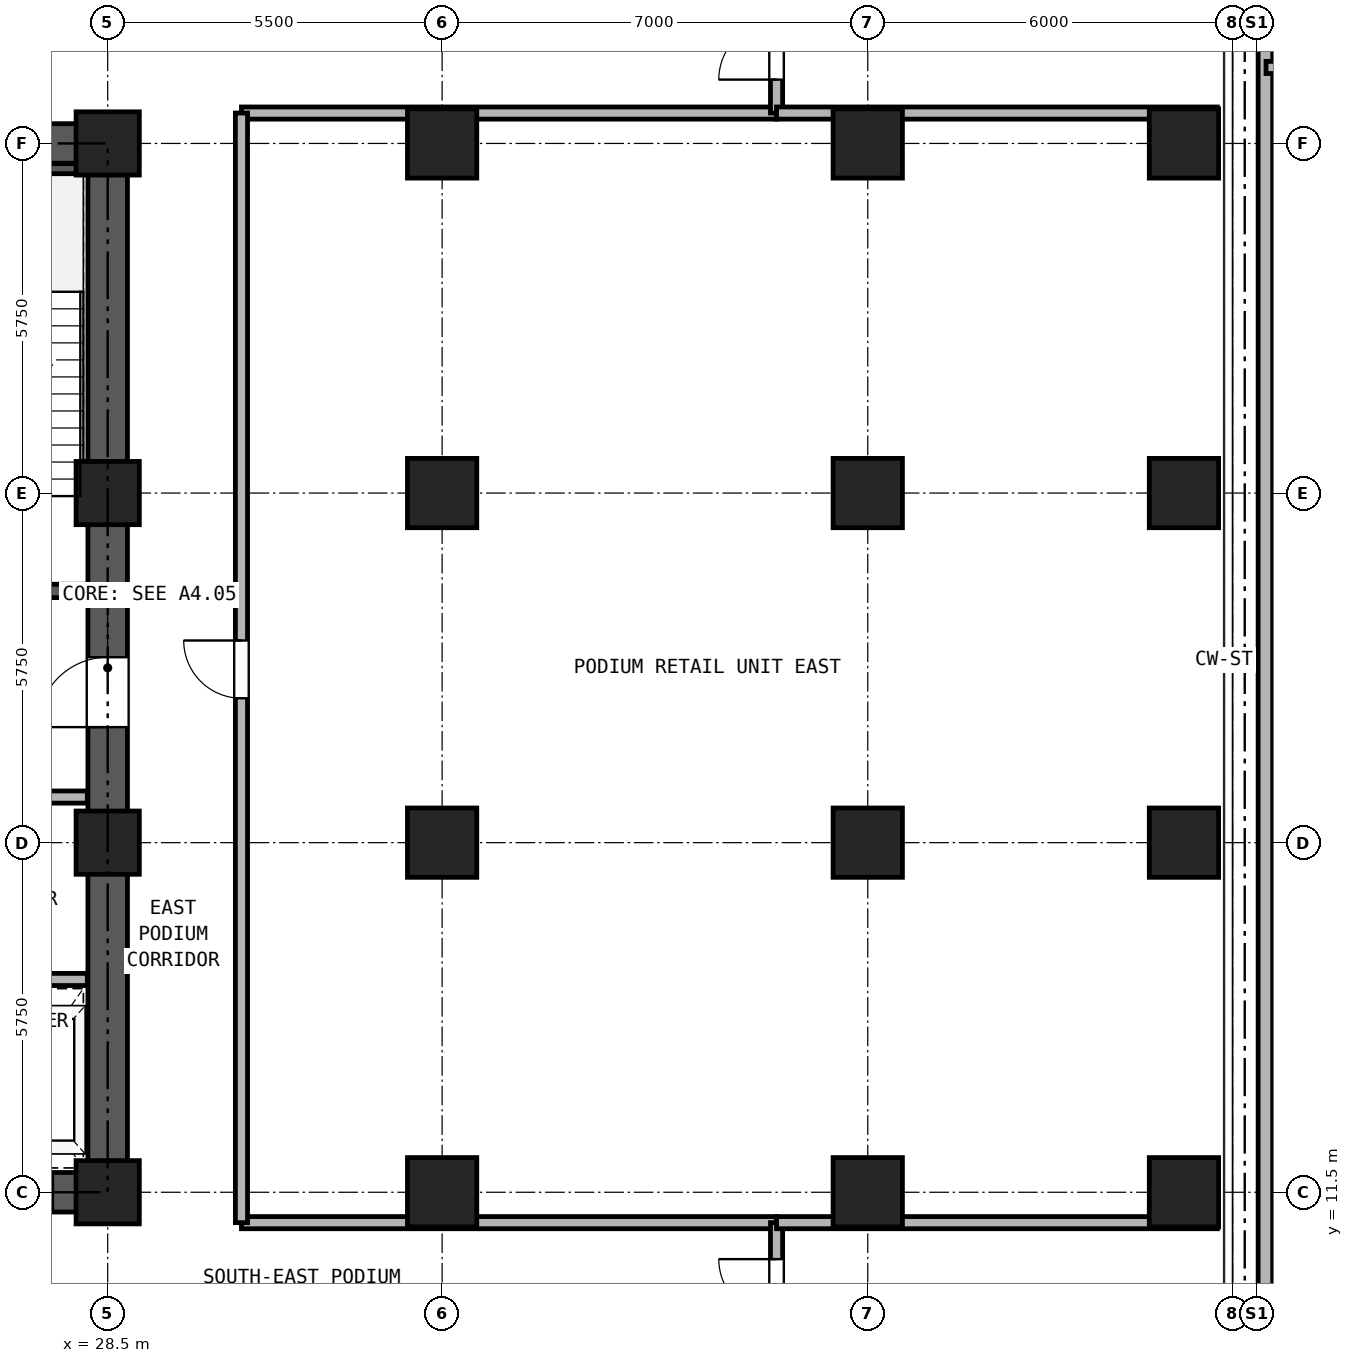
"""IFC4 building model, lengths in metres.
Left out: names, types, materials, properties, quantities, classifications, styles, units other than length and angle.
Written with IfcOpenShell. Run it as: python <this file> out.ifc"""

import sys

from ifc_helpers import new_model, si_unit, direction, frame, frame_2d, origin, origin_2d, place, context, subcontext, project, spatial, rectangle, hollow_rectangle, extrude, source, transform, mapped, element, fill, save


model = new_model("IFC4")
c1 = context("Model", 3, precision=1e-05, world=origin(), true_north=direction((0.0, 1.0)))
c2 = subcontext(c1, "Body", "Model", "MODEL_VIEW")
j1 = project(units=[si_unit("LENGTHUNIT", "METRE"), si_unit("PLANEANGLEUNIT", "RADIAN")], contexts=[c1])
p1 = place(None, origin())
s1 = spatial("IfcSite", under=j1, at=p1, CompositionType="ELEMENT")
p2 = place(p1, origin())
s2 = spatial("IfcBuilding", under=s1, at=p2, CompositionType="ELEMENT")
p3 = place(p2, frame((0.0, 0.0, 9.0)))
s3 = spatial("IfcBuildingStorey", under=s2, at=p3, CompositionType="ELEMENT", Elevation=9.0)
m1 = source(origin(), c2, "Body", "SweptSolid", [
    extrude(hollow_rectangle(XDim=1.14, YDim=1.14, WallThickness=0.07, at=origin_2d()), origin(), (0.0, 0.0, 1.0), 4.18),
])
for number, where, z_axis, x_axis in (
    (1, (46.2, 11.5, 0.0), (0.0, 0.0, 1.0), (1.0, 0.0, 0.0)),
    (2, (46.2, 17.25, 0.0), (0.0, 0.0, 1.0), (1.0, 0.0, 0.0)),
    (3, (46.2, 23.0, 0.0), (0.0, 0.0, 1.0), (1.0, 0.0, 0.0)),
    (4, (46.2, 28.75, 0.0), (0.0, 0.0, 1.0), (1.0, 0.0, 0.0)),
):
    element("IfcColumn", number, at=place(p3, frame(where, z_axis=z_axis, x_axis=x_axis)), inside=s3, PredefinedType="COLUMN", context=c2, shape_type="MappedRepresentation", body=[
        mapped(m1, transform((0.0, 0.0, 0.0), x_axis=(1.0, 0.0, 0.0), y_axis=(0.0, 1.0, 0.0), z_axis=(0.0, 0.0, 1.0), scale=1.0)),
    ])
m2 = source(origin(), c2, "Body", "SweptSolid", [
    extrude(hollow_rectangle(XDim=1.04, YDim=1.04, WallThickness=0.065, at=origin_2d()), origin(), (0.0, 0.0, 1.0), 4.18),
])
for number, where, z_axis, x_axis in (
    (5, (28.5, 11.5, 0.0), (0.0, 0.0, 1.0), (1.0, 0.0, 0.0)),
    (6, (28.5, 17.25, 0.0), (0.0, 0.0, 1.0), (1.0, 0.0, 0.0)),
    (7, (28.5, 23.0, 0.0), (0.0, 0.0, 1.0), (1.0, 0.0, 0.0)),
    (8, (28.5, 28.75, 0.0), (0.0, 0.0, 1.0), (1.0, 0.0, 0.0)),
):
    element("IfcColumn", number, at=place(p3, frame(where, z_axis=z_axis, x_axis=x_axis)), inside=s3, PredefinedType="COLUMN", context=c2, shape_type="MappedRepresentation", body=[
        mapped(m2, transform((0.0, 0.0, 0.0), x_axis=(1.0, 0.0, 0.0), y_axis=(0.0, 1.0, 0.0), z_axis=(0.0, 0.0, 1.0), scale=1.0)),
    ])
for number, where, z_axis, x_axis in (
    (9, (34.0, 11.5, 0.0), (0.0, 0.0, 1.0), (1.0, 0.0, 0.0)),
    (10, (34.0, 17.25, 0.0), (0.0, 0.0, 1.0), (1.0, 0.0, 0.0)),
    (11, (34.0, 23.0, 0.0), (0.0, 0.0, 1.0), (1.0, 0.0, 0.0)),
    (12, (34.0, 28.75, 0.0), (0.0, 0.0, 1.0), (1.0, 0.0, 0.0)),
    (13, (41.0, 11.5, 0.0), (0.0, 0.0, 1.0), (1.0, 0.0, 0.0)),
    (14, (41.0, 17.25, 0.0), (0.0, 0.0, 1.0), (1.0, 0.0, 0.0)),
    (15, (41.0, 23.0, 0.0), (0.0, 0.0, 1.0), (1.0, 0.0, 0.0)),
    (16, (41.0, 28.75, 0.0), (0.0, 0.0, 1.0), (1.0, 0.0, 0.0)),
):
    element("IfcColumn", number, at=place(p3, frame(where, z_axis=z_axis, x_axis=x_axis)), inside=s3, PredefinedType="COLUMN", context=c2, shape_type="MappedRepresentation", body=[
        mapped(m1, transform((0.0, 0.0, 0.0), x_axis=(1.0, 0.0, 0.0), y_axis=(0.0, 1.0, 0.0), z_axis=(0.0, 0.0, 1.0), scale=1.0)),
    ])
p4 = place(p3, frame((47.54, -0.54, 0.0), z_axis=(0.0, 0.0, 1.0), x_axis=(0.0, 1.0, 0.0)))
e17 = element("IfcWall", 17, at=p4, inside=s3, PredefinedType="SOLIDWALL", context=c2, shape_type="SweptSolid", body=[
    extrude(rectangle(XDim=40.89, YDim=0.24, at=frame_2d((20.445, 0.0))), origin(), (0.0, 0.0, 1.0), 4.18),
])
p5 = place(p3, frame((18.175, 11.5, 0.0), z_axis=(0.0, 0.0, 1.0), x_axis=(1.0, 0.0, 0.0)))
e18 = element("IfcWall", 18, at=p5, inside=s3, PredefinedType="SHEAR", context=c2, shape_type="SweptSolid", body=[
    extrude(rectangle(XDim=10.65, YDim=0.65, at=frame_2d((5.325, 0.0))), origin(), (0.0, 0.0, 1.0), 4.18),
])
p6 = place(p5, frame((1.195, 0.0, 0.0)))
e19 = element("IfcOpeningElement", 19, at=p6, cuts=e18, PredefinedType="OPENING", context=c2, shape_type="SweptSolid", body=[
    extrude(rectangle(XDim=1.1, YDim=2.25, at=frame_2d((0.55, 1.125))), frame((0.0, 0.335, 0.0), z_axis=(0.0, -1.0, 0.0), x_axis=(1.0, 0.0, 0.0)), (0.0, 0.0, 1.0), 0.67),
])
p7 = place(p5, frame((3.495, 0.0, 0.0)))
e20 = element("IfcOpeningElement", 20, at=p7, cuts=e18, PredefinedType="OPENING", context=c2, shape_type="SweptSolid", body=[
    extrude(rectangle(XDim=1.1, YDim=2.25, at=frame_2d((0.55, 1.125))), frame((0.0, 0.335, 0.0), z_axis=(0.0, -1.0, 0.0), x_axis=(1.0, 0.0, 0.0)), (0.0, 0.0, 1.0), 0.67),
])
p8 = place(p5, frame((5.925, 0.0, 0.0)))
e21 = element("IfcOpeningElement", 21, at=p8, cuts=e18, PredefinedType="OPENING", context=c2, shape_type="SweptSolid", body=[
    extrude(rectangle(XDim=1.1, YDim=2.25, at=frame_2d((0.55, 1.125))), frame((0.0, 0.335, 0.0), z_axis=(0.0, -1.0, 0.0), x_axis=(1.0, 0.0, 0.0)), (0.0, 0.0, 1.0), 0.67),
])
p9 = place(p5, frame((8.325, 0.0, 0.0)))
e22 = element("IfcOpeningElement", 22, at=p9, cuts=e18, PredefinedType="OPENING", context=c2, shape_type="SweptSolid", body=[
    extrude(rectangle(XDim=1.1, YDim=2.25, at=frame_2d((0.55, 1.125))), frame((0.0, 0.335, 0.0), z_axis=(0.0, -1.0, 0.0), x_axis=(1.0, 0.0, 0.0)), (0.0, 0.0, 1.0), 0.67),
])
p10 = place(p3, frame((18.175, 28.75, 0.0), z_axis=(0.0, 0.0, 1.0), x_axis=(1.0, 0.0, 0.0)))
e23 = element("IfcWall", 23, at=p10, inside=s3, PredefinedType="SHEAR", context=c2, shape_type="SweptSolid", body=[
    extrude(rectangle(XDim=10.65, YDim=0.65, at=frame_2d((5.325, 0.0))), origin(), (0.0, 0.0, 1.0), 4.18),
])
p11 = place(p10, frame((4.205, 0.0, 0.0)))
e24 = element("IfcOpeningElement", 24, at=p11, cuts=e23, PredefinedType="OPENING", context=c2, shape_type="SweptSolid", body=[
    extrude(rectangle(XDim=0.9, YDim=2.05, at=frame_2d((0.45, 1.025))), frame((0.0, 0.335, 0.0), z_axis=(0.0, -1.0, 0.0), x_axis=(1.0, 0.0, 0.0)), (0.0, 0.0, 1.0), 0.67),
])
p12 = place(p10, frame((5.745, 0.0, 0.0)))
e25 = element("IfcOpeningElement", 25, at=p12, cuts=e23, PredefinedType="OPENING", context=c2, shape_type="SweptSolid", body=[
    extrude(rectangle(XDim=0.9, YDim=2.05, at=frame_2d((0.45, 1.025))), frame((0.0, 0.335, 0.0), z_axis=(0.0, -1.0, 0.0), x_axis=(1.0, 0.0, 0.0)), (0.0, 0.0, 1.0), 0.67),
])
p13 = place(p3, frame((28.5, 11.825, 0.0), z_axis=(0.0, 0.0, 1.0), x_axis=(0.0, 1.0, 0.0)))
e26 = element("IfcWall", 26, at=p13, inside=s3, PredefinedType="SHEAR", context=c2, shape_type="SweptSolid", body=[
    extrude(rectangle(XDim=16.6, YDim=0.65, at=frame_2d((8.3, 0.0))), origin(), (0.0, 0.0, 1.0), 4.18),
])
p14 = place(p13, frame((7.325, 0.0, 0.0)))
e27 = element("IfcOpeningElement", 27, at=p14, cuts=e26, PredefinedType="OPENING", context=c2, shape_type="SweptSolid", body=[
    extrude(rectangle(XDim=1.15, YDim=2.2, at=frame_2d((0.575, 1.1))), frame((0.0, 0.335, 0.0), z_axis=(0.0, -1.0, 0.0), x_axis=(1.0, 0.0, 0.0)), (0.0, 0.0, 1.0), 0.67),
])
p15 = place(p3, frame((25.13, 28.335, 0.0), z_axis=(0.0, 0.0, 1.0), x_axis=(1.0, 0.0, 0.0)))
e28 = element("IfcWall", 28, at=p15, inside=s3, PredefinedType="PARTITIONING", context=c2, shape_type="SweptSolid", body=[
    extrude(rectangle(XDim=3.035, YDim=0.165, at=frame_2d((1.518, 0.0))), origin(), (0.0, 0.0, 1.0), 4.18),
])
p16 = place(p3, frame((25.13, 21.39, 0.0), z_axis=(0.0, 0.0, 1.0), x_axis=(1.0, 0.0, 0.0)))
e29 = element("IfcWall", 29, at=p16, inside=s3, PredefinedType="SOLIDWALL", context=c2, shape_type="SweptSolid", body=[
    extrude(rectangle(XDim=3.035, YDim=0.22, at=frame_2d((1.518, 0.0))), origin(), (0.0, 0.0, 1.0), 4.18),
])
p17 = place(p16, frame((0.92, 0.0, 0.0)))
e30 = element("IfcOpeningElement", 30, at=p17, cuts=e29, PredefinedType="OPENING", context=c2, shape_type="SweptSolid", body=[
    extrude(rectangle(XDim=1.15, YDim=2.2, at=frame_2d((0.575, 1.1))), frame((0.0, 0.12, 0.0), z_axis=(0.0, -1.0, 0.0), x_axis=(1.0, 0.0, 0.0)), (0.0, 0.0, 1.0), 0.24),
])
p18 = place(p3, frame((18.835, 18.0, 0.0), z_axis=(0.0, 0.0, 1.0), x_axis=(1.0, 0.0, 0.0)))
e31 = element("IfcWall", 31, at=p18, inside=s3, PredefinedType="PARTITIONING", context=c2, shape_type="SweptSolid", body=[
    extrude(rectangle(XDim=9.33, YDim=0.2, at=frame_2d((4.665, 0.0))), origin(), (0.0, 0.0, 1.0), 4.18),
])
p19 = place(p18, frame((0.415, 0.0, 0.0)))
e32 = element("IfcOpeningElement", 32, at=p19, cuts=e31, PredefinedType="OPENING", context=c2, shape_type="SweptSolid", body=[
    extrude(rectangle(XDim=1.3, YDim=2.3, at=frame_2d((0.65, 1.15))), frame((0.0, 0.11, 0.0), z_axis=(0.0, -1.0, 0.0), x_axis=(1.0, 0.0, 0.0)), (0.0, 0.0, 1.0), 0.22),
])
p20 = place(p18, frame((2.515, 0.0, 0.0)))
e33 = element("IfcOpeningElement", 33, at=p20, cuts=e31, PredefinedType="OPENING", context=c2, shape_type="SweptSolid", body=[
    extrude(rectangle(XDim=1.3, YDim=2.3, at=frame_2d((0.65, 1.15))), frame((0.0, 0.11, 0.0), z_axis=(0.0, -1.0, 0.0), x_axis=(1.0, 0.0, 0.0)), (0.0, 0.0, 1.0), 0.22),
])
p21 = place(p18, frame((4.915, 0.0, 0.0)))
e34 = element("IfcOpeningElement", 34, at=p21, cuts=e31, PredefinedType="OPENING", context=c2, shape_type="SweptSolid", body=[
    extrude(rectangle(XDim=0.9, YDim=2.05, at=frame_2d((0.45, 1.025))), frame((0.0, 0.11, 0.0), z_axis=(0.0, -1.0, 0.0), x_axis=(1.0, 0.0, 0.0)), (0.0, 0.0, 1.0), 0.22),
])
p22 = place(p18, frame((7.615, 0.0, 0.0)))
e35 = element("IfcOpeningElement", 35, at=p22, cuts=e31, PredefinedType="OPENING", context=c2, shape_type="SweptSolid", body=[
    extrude(rectangle(XDim=0.9, YDim=2.05, at=frame_2d((0.45, 1.025))), frame((0.0, 0.11, 0.0), z_axis=(0.0, -1.0, 0.0), x_axis=(1.0, 0.0, 0.0)), (0.0, 0.0, 1.0), 0.22),
])
p23 = place(p3, frame((18.835, 15.0, 0.0), z_axis=(0.0, 0.0, 1.0), x_axis=(1.0, 0.0, 0.0)))
e36 = element("IfcWall", 36, at=p23, inside=s3, PredefinedType="PARTITIONING", context=c2, shape_type="SweptSolid", body=[
    extrude(rectangle(XDim=9.33, YDim=0.2, at=frame_2d((4.665, 0.0))), origin(), (0.0, 0.0, 1.0), 4.18),
])
for number, where, z_axis, x_axis in (
    (37, (30.7, 11.0, 0.0), (0.0, 0.0, 1.0), (1.0, 0.0, 0.0)),
    (38, (30.7, 29.25, 0.0), (0.0, 0.0, 1.0), (1.0, 0.0, 0.0)),
):
    element("IfcWall", number, at=place(p3, frame(where, z_axis=z_axis, x_axis=x_axis)), inside=s3, PredefinedType="PARTITIONING", context=c2, shape_type="SweptSolid", body=[
        extrude(rectangle(XDim=8.8, YDim=0.2, at=frame_2d((4.4, 0.0))), origin(), (0.0, 0.0, 1.0), 4.18),
    ])
p24 = place(p3, frame((30.7, 11.0, 0.0), z_axis=(0.0, 0.0, 1.0), x_axis=(0.0, 1.0, 0.0)))
e39 = element("IfcWall", 39, at=p24, inside=s3, PredefinedType="PARTITIONING", context=c2, shape_type="SweptSolid", body=[
    extrude(rectangle(XDim=18.25, YDim=0.2, at=frame_2d((9.125, 0.0))), origin(), (0.0, 0.0, 1.0), 4.18),
])
p25 = place(p24, frame((8.625, 0.0, 0.0)))
e40 = element("IfcOpeningElement", 40, at=p25, cuts=e39, PredefinedType="OPENING", context=c2, shape_type="SweptSolid", body=[
    extrude(rectangle(XDim=0.95, YDim=2.15, at=frame_2d((0.475, 1.075))), frame((0.0, 0.11, 0.0), z_axis=(0.0, -1.0, 0.0), x_axis=(1.0, 0.0, 0.0)), (0.0, 0.0, 1.0), 0.22),
])
p26 = place(p3, frame((39.5, 0.25, 0.0), z_axis=(0.0, 0.0, 1.0), x_axis=(0.0, 1.0, 0.0)))
e41 = element("IfcWall", 41, at=p26, inside=s3, PredefinedType="PARTITIONING", context=c2, shape_type="SweptSolid", body=[
    extrude(rectangle(XDim=10.75, YDim=0.2, at=frame_2d((5.375, 0.0))), origin(), (0.0, 0.0, 1.0), 4.18),
])
p27 = place(p26, frame((9.2, 0.0, 0.0)))
e42 = element("IfcOpeningElement", 42, at=p27, cuts=e41, PredefinedType="OPENING", context=c2, shape_type="SweptSolid", body=[
    extrude(rectangle(XDim=0.95, YDim=2.15, at=frame_2d((0.475, 1.075))), frame((0.0, 0.11, 0.0), z_axis=(0.0, -1.0, 0.0), x_axis=(1.0, 0.0, 0.0)), (0.0, 0.0, 1.0), 0.22),
])
p28 = place(p3, frame((39.5, 29.25, 0.0), z_axis=(0.0, 0.0, 1.0), x_axis=(0.0, 1.0, 0.0)))
e43 = element("IfcWall", 43, at=p28, inside=s3, PredefinedType="PARTITIONING", context=c2, shape_type="SweptSolid", body=[
    extrude(rectangle(XDim=11.0, YDim=0.2, at=frame_2d((5.5, 0.0))), origin(), (0.0, 0.0, 1.0), 4.18),
])
p29 = place(p28, frame((0.55, 0.0, 0.0)))
e44 = element("IfcOpeningElement", 44, at=p29, cuts=e43, PredefinedType="OPENING", context=c2, shape_type="SweptSolid", body=[
    extrude(rectangle(XDim=0.95, YDim=2.15, at=frame_2d((0.475, 1.075))), frame((0.0, 0.11, 0.0), z_axis=(0.0, -1.0, 0.0), x_axis=(1.0, 0.0, 0.0)), (0.0, 0.0, 1.0), 0.22),
])
for number, where, z_axis, x_axis in (
    (45, (39.5, 11.0, 0.0), (0.0, 0.0, 1.0), (1.0, 0.0, 0.0)),
    (46, (39.5, 29.25, 0.0), (0.0, 0.0, 1.0), (1.0, 0.0, 0.0)),
):
    element("IfcWall", number, at=place(p3, frame(where, z_axis=z_axis, x_axis=x_axis)), inside=s3, PredefinedType="PARTITIONING", context=c2, shape_type="SweptSolid", body=[
        extrude(rectangle(XDim=7.25, YDim=0.2, at=frame_2d((3.625, 0.0))), origin(), (0.0, 0.0, 1.0), 4.18),
    ])
p30 = place(p3, frame((47.55, 30.0, 0.0), z_axis=(0.0, 0.0, 1.0), x_axis=(1.0, 0.0, 0.0)))
e47 = element("IfcWall", 47, at=p30, inside=s3, PredefinedType="PARTITIONING", context=c2, shape_type="SweptSolid", body=[
    extrude(rectangle(XDim=23.9, YDim=0.2, at=frame_2d((11.95, 0.0))), origin(), (0.0, 0.0, 1.0), 4.18),
])
p31 = place(p30, frame((3.45, 0.0, 0.0)))
e48 = element("IfcOpeningElement", 48, at=p31, cuts=e47, PredefinedType="OPENING", context=c2, shape_type="SweptSolid", body=[
    extrude(rectangle(XDim=1.3, YDim=2.2, at=frame_2d((0.65, 1.1))), frame((0.0, 0.11, 0.0), z_axis=(0.0, -1.0, 0.0), x_axis=(1.0, 0.0, 0.0)), (0.0, 0.0, 1.0), 0.22),
])
p32 = place(p14, origin())
e49 = element("IfcDoor", 49, at=p32, inside=s3, OperationType="SINGLE_SWING_LEFT", PredefinedType="DOOR", context=c2, shape_type="SweptSolid", body=[
    extrude(rectangle(XDim=1.15, YDim=2.2, at=frame_2d((0.575, 1.1))), frame((0.0, 0.025, 0.0), z_axis=(0.0, -1.0, 0.0), x_axis=(1.0, 0.0, 0.0)), (0.0, 0.0, 1.0), 0.05),
])
fill(e27, e49)
p33 = place(p9, frame((1.1, 0.0, 0.0), z_axis=(0.0, 0.0, 1.0), x_axis=(-1.0, 0.0, 0.0)))
e50 = element("IfcDoor", 50, at=p33, inside=s3, OperationType="DOUBLE_DOOR_SLIDING", PredefinedType="DOOR", context=c2, shape_type="SweptSolid", body=[
    extrude(rectangle(XDim=1.1, YDim=2.25, at=frame_2d((0.55, 1.125))), frame((0.0, 0.025, 0.0), z_axis=(0.0, -1.0, 0.0), x_axis=(1.0, 0.0, 0.0)), (0.0, 0.0, 1.0), 0.05),
])
fill(e22, e50)
p34 = place(p27, origin())
e51 = element("IfcDoor", 51, at=p34, inside=s3, OperationType="SINGLE_SWING_RIGHT", PredefinedType="DOOR", context=c2, shape_type="SweptSolid", body=[
    extrude(rectangle(XDim=0.95, YDim=2.15, at=frame_2d((0.475, 1.075))), frame((0.0, 0.025, 0.0), z_axis=(0.0, -1.0, 0.0), x_axis=(1.0, 0.0, 0.0)), (0.0, 0.0, 1.0), 0.05),
])
fill(e42, e51)
p35 = place(p29, origin())
e52 = element("IfcDoor", 52, at=p35, inside=s3, OperationType="SINGLE_SWING_LEFT", PredefinedType="DOOR", context=c2, shape_type="SweptSolid", body=[
    extrude(rectangle(XDim=0.95, YDim=2.15, at=frame_2d((0.475, 1.075))), frame((0.0, 0.025, 0.0), z_axis=(0.0, -1.0, 0.0), x_axis=(1.0, 0.0, 0.0)), (0.0, 0.0, 1.0), 0.05),
])
fill(e44, e52)
p36 = place(p25, origin())
e53 = element("IfcDoor", 53, at=p36, inside=s3, OperationType="SINGLE_SWING_RIGHT", PredefinedType="DOOR", context=c2, shape_type="SweptSolid", body=[
    extrude(rectangle(XDim=0.95, YDim=2.15, at=frame_2d((0.475, 1.075))), frame((0.0, 0.025, 0.0), z_axis=(0.0, -1.0, 0.0), x_axis=(1.0, 0.0, 0.0)), (0.0, 0.0, 1.0), 0.05),
])
fill(e40, e53)
save(model, sys.argv[1])
